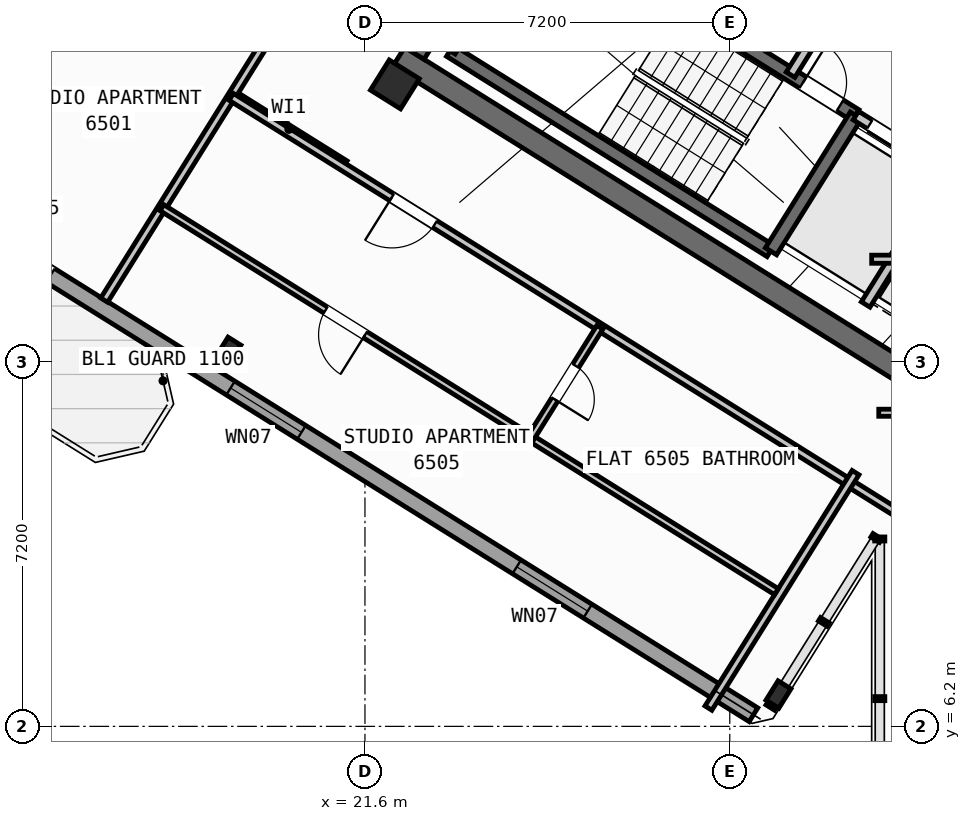
"""IFC4 building model, lengths in metres.
Left out: names, types, materials, properties, quantities, classifications, styles, units other than length and angle.
Written with IfcOpenShell. Run it as: python <this file> out.ifc"""

import sys

from ifc_helpers import new_model, si_unit, direction, frame, frame_2d, origin, origin_2d, place, context, subcontext, project, spatial, rectangle, hollow_rectangle, i_section, extrude, source, transform, mapped, element, fill, save


model = new_model("IFC4")
c1 = context("Model", 3, precision=1e-05, world=origin(), true_north=direction((0.0, 1.0)))
c2 = subcontext(c1, "Body", "Model", "MODEL_VIEW")
j1 = project(units=[si_unit("LENGTHUNIT", "METRE"), si_unit("PLANEANGLEUNIT", "RADIAN")], contexts=[c1])
p1 = place(None, origin())
s1 = spatial("IfcSite", under=j1, at=p1, CompositionType="ELEMENT")
p2 = place(p1, origin())
s2 = spatial("IfcBuilding", under=s1, at=p2, CompositionType="ELEMENT")
p3 = place(p2, frame((0.0, 0.0, 259.2)))
s3 = spatial("IfcBuildingStorey", under=s2, at=p3, CompositionType="ELEMENT", Elevation=259.2)
p4 = place(p3, frame((33.324, 12.503, 0.0), z_axis=(0.0, 0.0, 1.0), x_axis=(-0.848043529849, 0.529926571782, 0.0)))
e1 = element("IfcWall", 1, at=p4, inside=s3, PredefinedType="SHEAR", context=c2, shape_type="SweptSolid", body=[
    extrude(rectangle(XDim=13.04, YDim=0.45, at=frame_2d((6.52, 0.0))), origin(), (0.0, 0.0, 1.0), 3.35),
])
p5 = place(p3, frame((26.007, 24.976, 0.0), z_axis=(0.0, 0.0, 1.0), x_axis=(-0.529931155655, -0.848040665456, 0.0)))
e2 = element("IfcWall", 2, at=p5, inside=s3, PredefinedType="SHEAR", context=c2, shape_type="SweptSolid", body=[
    extrude(rectangle(XDim=6.475, YDim=0.45, at=frame_2d((3.238, 0.0))), origin(), (0.0, 0.0, 1.0), 3.35),
])
m1 = source(origin(), c2, "Body", "SweptSolid", [
    extrude(i_section(OverallWidth=0.3, OverallDepth=0.45, WebThickness=0.014, FlangeThickness=0.026, at=origin_2d()), origin(), (0.0, 0.0, 1.0), 3.6),
])
p6 = place(p3, frame((29.761, 6.829, 0.0), z_axis=(0.0, 0.0, 1.0), x_axis=(-0.848048096156, 0.529919264233, 0.0)))
e3 = element("IfcColumn", 3, at=p6, inside=s3, PredefinedType="COLUMN", context=c2, shape_type="MappedRepresentation", body=[
    mapped(m1, transform((0.0, 0.0, 0.0), scale=1.0)),
])
m2 = source(origin(), c2, "Body", "SweptSolid", [
    extrude(hollow_rectangle(XDim=0.7, YDim=0.7, WallThickness=0.028, at=origin_2d()), origin(), (0.0, 0.0, 1.0), 3.6),
])
p7 = place(p3, frame((22.191, 18.87, 0.0), z_axis=(0.0, 0.0, 1.0), x_axis=(-0.848048096156, 0.529919264233, 0.0)))
e4 = element("IfcColumn", 4, at=p7, inside=s3, PredefinedType="COLUMN", context=c2, shape_type="MappedRepresentation", body=[
    mapped(m2, transform((0.0, 0.0, 0.0), scale=1.0)),
])
p8 = place(p3, frame((18.906, 13.612, 0.0), z_axis=(0.0, 0.0, 1.0), x_axis=(-0.848048096156, 0.529919264233, 0.0)))
e5 = element("IfcColumn", 5, at=p8, inside=s3, PredefinedType="COLUMN", context=c2, shape_type="MappedRepresentation", body=[
    mapped(m1, transform((0.0, 0.0, 0.0), scale=1.0)),
])
p9 = place(p3, frame((29.268, 6.429, 0.0), z_axis=(0.0, 0.0, 1.0), x_axis=(-0.848049971435, 0.529916263149, 0.0)))
e6 = element("IfcWall", 6, at=p9, inside=s3, PredefinedType="STANDARD", context=c2, shape_type="SweptSolid", body=[
    extrude(rectangle(XDim=31.588, YDim=0.32, at=frame_2d((15.794, 0.0))), origin(), (0.0, 0.0, 1.0), 3.35),
])
p10 = place(p9, frame((16.362, 0.0, 0.0)))
e7 = element("IfcOpeningElement", 7, at=p10, cuts=e6, PredefinedType="OPENING", context=c2, shape_type="SweptSolid", body=[
    extrude(rectangle(XDim=1.2, YDim=2.15, at=frame_2d((0.6, 1.075))), frame((0.0, 0.17, 0.0), z_axis=(0.0, -1.0, 0.0), x_axis=(1.0, 0.0, 0.0)), (0.0, 0.0, 1.0), 0.34),
])
p11 = place(p9, frame((3.859, 0.0, 0.9)))
e8 = element("IfcOpeningElement", 8, at=p11, cuts=e6, PredefinedType="OPENING", context=c2, shape_type="SweptSolid", body=[
    extrude(rectangle(XDim=1.65, YDim=1.45, at=frame_2d((0.825, 0.725))), frame((0.0, 0.17, 0.0), z_axis=(0.0, -1.0, 0.0), x_axis=(1.0, 0.0, 0.0)), (0.0, 0.0, 1.0), 0.34),
])
p12 = place(p9, frame((10.519, 0.0, 0.9)))
e9 = element("IfcOpeningElement", 9, at=p12, cuts=e6, PredefinedType="OPENING", context=c2, shape_type="SweptSolid", body=[
    extrude(rectangle(XDim=1.65, YDim=1.45, at=frame_2d((0.825, 0.725))), frame((0.0, 0.17, 0.0), z_axis=(0.0, -1.0, 0.0), x_axis=(1.0, 0.0, 0.0)), (0.0, 0.0, 1.0), 0.34),
])
p13 = place(p9, frame((28.413, 0.0, 0.95)))
e10 = element("IfcOpeningElement", 10, at=p13, cuts=e6, PredefinedType="OPENING", context=c2, shape_type="SweptSolid", body=[
    extrude(rectangle(XDim=1.95, YDim=1.35, at=frame_2d((0.975, 0.675))), frame((0.0, 0.17, 0.0), z_axis=(0.0, -1.0, 0.0), x_axis=(1.0, 0.0, 0.0)), (0.0, 0.0, 1.0), 0.34),
])
p14 = place(p9, frame((19.699, 0.0, 1.0)))
e11 = element("IfcOpeningElement", 11, at=p14, cuts=e6, PredefinedType="OPENING", context=c2, shape_type="SweptSolid", body=[
    extrude(rectangle(XDim=0.65, YDim=1.15, at=frame_2d((0.325, 0.575))), frame((0.0, 0.17, 0.0), z_axis=(0.0, -1.0, 0.0), x_axis=(1.0, 0.0, 0.0)), (0.0, 0.0, 1.0), 0.34),
])
p15 = place(p9, frame((21.721, 0.0, 1.0)))
e12 = element("IfcOpeningElement", 12, at=p15, cuts=e6, PredefinedType="OPENING", context=c2, shape_type="SweptSolid", body=[
    extrude(rectangle(XDim=0.65, YDim=1.15, at=frame_2d((0.325, 0.575))), frame((0.0, 0.17, 0.0), z_axis=(0.0, -1.0, 0.0), x_axis=(1.0, 0.0, 0.0)), (0.0, 0.0, 1.0), 0.34),
])
p16 = place(p9, frame((23.756, 0.0, 1.0)))
e13 = element("IfcOpeningElement", 13, at=p16, cuts=e6, PredefinedType="OPENING", context=c2, shape_type="SweptSolid", body=[
    extrude(rectangle(XDim=0.65, YDim=1.15, at=frame_2d((0.325, 0.575))), frame((0.0, 0.17, 0.0), z_axis=(0.0, -1.0, 0.0), x_axis=(1.0, 0.0, 0.0)), (0.0, 0.0, 1.0), 0.34),
])
p17 = place(p9, frame((25.791, 0.0, 1.0)))
e14 = element("IfcOpeningElement", 14, at=p17, cuts=e6, PredefinedType="OPENING", context=c2, shape_type="SweptSolid", body=[
    extrude(rectangle(XDim=0.65, YDim=1.15, at=frame_2d((0.325, 0.575))), frame((0.0, 0.17, 0.0), z_axis=(0.0, -1.0, 0.0), x_axis=(1.0, 0.0, 0.0)), (0.0, 0.0, 1.0), 0.34),
])
p18 = place(p3, frame((29.605, 15.581, 0.0), z_axis=(0.0, 0.0, 1.0), x_axis=(-0.848036911448, 0.529937163087, 0.0)))
e15 = element("IfcWall", 15, at=p18, inside=s3, PredefinedType="SHEAR", context=c2, shape_type="SweptSolid", body=[
    extrude(rectangle(XDim=7.46, YDim=0.26, at=frame_2d((3.73, 0.0))), origin(), (0.0, 0.0, 1.0), 3.35),
])
p19 = place(p3, frame((31.28, 18.261, 0.0), z_axis=(0.0, 0.0, 1.0), x_axis=(-0.848051618787, 0.529913626805, 0.0)))
e16 = element("IfcWall", 16, at=p19, inside=s3, PredefinedType="SHEAR", context=c2, shape_type="SweptSolid", body=[
    extrude(rectangle(XDim=7.46, YDim=0.26, at=frame_2d((3.73, 0.0))), origin(), (0.0, 0.0, 1.0), 3.35),
])
p20 = place(p19, frame((0.36, 0.0, 0.0)))
e17 = element("IfcOpeningElement", 17, at=p20, cuts=e16, PredefinedType="OPENING", context=c2, shape_type="SweptSolid", body=[
    extrude(rectangle(XDim=0.86, YDim=2.05, at=frame_2d((0.43, 1.025))), frame((0.0, 0.14, 0.0), z_axis=(0.0, -1.0, 0.0), x_axis=(1.0, 0.0, 0.0)), (0.0, 0.0, 1.0), 0.28),
])
p21 = place(p3, frame((31.288, 18.256, 0.0), z_axis=(0.0, 0.0, 1.0), x_axis=(-0.529943379326, -0.848033026897, 0.0)))
e18 = element("IfcWall", 18, at=p21, inside=s3, PredefinedType="SHEAR", context=c2, shape_type="SweptSolid", body=[
    extrude(rectangle(XDim=3.16, YDim=0.26, at=frame_2d((1.58, 0.0))), origin(), (0.0, 0.0, 1.0), 3.35),
])
p22 = place(p3, frame((24.945, 22.22, 0.0), z_axis=(0.0, 0.0, 1.0), x_axis=(-0.529908658664, -0.84805472316, 0.0)))
e19 = element("IfcWall", 19, at=p22, inside=s3, PredefinedType="SHEAR", context=c2, shape_type="SweptSolid", body=[
    extrude(rectangle(XDim=3.16, YDim=0.26, at=frame_2d((1.58, 0.0))), origin(), (0.0, 0.0, 1.0), 3.35),
])
p23 = place(p3, frame((34.933, 15.978, 0.0), z_axis=(0.0, 0.0, 1.0), x_axis=(-0.848055739377, 0.529907032327, 0.0)))
e20 = element("IfcWall", 20, at=p23, inside=s3, PredefinedType="STANDARD", context=c2, shape_type="SweptSolid", body=[
    extrude(rectangle(XDim=4.298, YDim=0.2, at=frame_2d((2.149, 0.0))), origin(), (0.0, 0.0, 1.0), 3.34),
])
p24 = place(p23, frame((0.448, 0.0, 0.0)))
e21 = element("IfcOpeningElement", 21, at=p24, cuts=e20, PredefinedType="OPENING", context=c2, shape_type="SweptSolid", body=[
    extrude(rectangle(XDim=1.3, YDim=2.2, at=frame_2d((0.65, 1.1))), frame((0.0, 0.11, 0.0), z_axis=(0.0, -1.0, 0.0), x_axis=(1.0, 0.0, 0.0)), (0.0, 0.0, 1.0), 0.22),
])
p25 = place(p23, frame((2.523, 0.0, 0.0)))
e22 = element("IfcOpeningElement", 22, at=p25, cuts=e20, PredefinedType="OPENING", context=c2, shape_type="SweptSolid", body=[
    extrude(rectangle(XDim=1.45, YDim=2.25, at=frame_2d((0.725, 1.125))), frame((0.0, 0.11, 0.0), z_axis=(0.0, -1.0, 0.0), x_axis=(1.0, 0.0, 0.0)), (0.0, 0.0, 1.0), 0.22),
])
p26 = place(p3, frame((36.459, 18.421, 0.0), z_axis=(0.0, 0.0, 1.0), x_axis=(-0.848059591691, 0.529900867089, 0.0)))
e23 = element("IfcWall", 23, at=p26, inside=s3, PredefinedType="STANDARD", context=c2, shape_type="SweptSolid", body=[
    extrude(rectangle(XDim=5.818, YDim=0.2, at=frame_2d((2.909, 0.0))), origin(), (0.0, 0.0, 1.0), 3.34),
])
p27 = place(p26, frame((2.598, 0.0, 0.0)))
e24 = element("IfcOpeningElement", 24, at=p27, cuts=e23, PredefinedType="OPENING", context=c2, shape_type="SweptSolid", body=[
    extrude(rectangle(XDim=1.15, YDim=2.1, at=frame_2d((0.575, 1.05))), frame((0.0, 0.11, 0.0), z_axis=(0.0, -1.0, 0.0), x_axis=(1.0, 0.0, 0.0)), (0.0, 0.0, 1.0), 0.22),
])
p28 = place(p3, frame((33.029, 17.003, 0.0), z_axis=(0.0, 0.0, 1.0), x_axis=(-0.529916267533, -0.848049968695, 0.0)))
e25 = element("IfcWall", 25, at=p28, inside=s3, PredefinedType="STANDARD", context=c2, shape_type="SweptSolid", body=[
    extrude(rectangle(XDim=2.92, YDim=0.2, at=frame_2d((1.46, 0.0))), origin(), (0.0, 0.0, 1.0), 3.34),
])
p29 = place(p3, frame((31.525, 21.504, 0.0), z_axis=(0.0, 0.0, 1.0), x_axis=(-0.529907497854, -0.848055448493, 0.0)))
e26 = element("IfcWall", 26, at=p29, inside=s3, PredefinedType="STANDARD", context=c2, shape_type="SweptSolid", body=[
    extrude(rectangle(XDim=2.88, YDim=0.2, at=frame_2d((1.44, 0.0))), origin(), (0.0, 0.0, 1.0), 3.34),
])
p30 = place(p3, frame((21.206, 17.292, 0.0), z_axis=(0.0, 0.0, 1.0), x_axis=(-0.848050851465, 0.529914854792, 0.0)))
e27 = element("IfcWall", 27, at=p30, inside=s3, PredefinedType="PARTITIONING", context=c2, shape_type="SweptSolid", body=[
    extrude(rectangle(XDim=2.61, YDim=0.16, at=frame_2d((1.305, 0.0))), origin(), (0.0, 0.0, 1.0), 3.34),
])
p31 = place(p3, frame((23.899, 26.529, 0.0), z_axis=(0.0, 0.0, 1.0), x_axis=(-0.529917716469, -0.848049063305, 0.0)))
e28 = element("IfcWall", 28, at=p31, inside=s3, PredefinedType="PARTITIONING", context=c2, shape_type="SweptSolid", body=[
    extrude(rectangle(XDim=14.05, YDim=0.16, at=frame_2d((7.025, 0.0))), origin(), (0.0, 0.0, 1.0), 3.34),
])
p32 = place(p3, frame((16.572, 21.954, 0.0), z_axis=(0.0, 0.0, 1.0), x_axis=(-0.529904903214, -0.848057069748, 0.0)))
e29 = element("IfcWall", 29, at=p32, inside=s3, PredefinedType="PARTITIONING", context=c2, shape_type="SweptSolid", body=[
    extrude(rectangle(XDim=5.601, YDim=0.16, at=frame_2d((2.801, 0.0))), origin(), (0.0, 0.0, 1.0), 2.875),
])
p33 = place(p3, frame((16.638, 25.901, 0.0), z_axis=(0.0, 0.0, 1.0), x_axis=(-0.529910626741, -0.8480534934, 0.0)))
e30 = element("IfcWall", 30, at=p33, inside=s3, PredefinedType="PARTITIONING", context=c2, shape_type="SweptSolid", body=[
    extrude(rectangle(XDim=9.94, YDim=0.11, at=frame_2d((4.97, 0.0))), origin(), (0.0, 0.0, 1.0), 3.025),
])
p34 = place(p3, frame((32.164, 10.374, 0.0), z_axis=(0.0, 0.0, 1.0), x_axis=(-0.848044107957, 0.529925646633, 0.0)))
e31 = element("IfcWall", 31, at=p34, inside=s3, PredefinedType="PARTITIONING", context=c2, shape_type="SweptSolid", body=[
    extrude(rectangle(XDim=15.57, YDim=0.16, at=frame_2d((7.785, 0.0))), origin(), (0.0, 0.0, 1.0), 3.34),
])
p35 = place(p34, frame((10.83, 0.0, 0.0)))
e32 = element("IfcOpeningElement", 32, at=p35, cuts=e31, PredefinedType="OPENING", context=c2, shape_type="SweptSolid", body=[
    extrude(rectangle(XDim=1.0, YDim=2.1, at=frame_2d((0.5, 1.05))), frame((0.0, 0.09, 0.0), z_axis=(0.0, -1.0, 0.0), x_axis=(1.0, 0.0, 0.0)), (0.0, 0.0, 1.0), 0.18),
])
p36 = place(p3, frame((31.282, 11.208, 0.0), z_axis=(0.0, 0.0, 1.0), x_axis=(-0.529938869374, -0.84803584519, 0.0)))
e33 = element("IfcWall", 33, at=p36, inside=s3, PredefinedType="PARTITIONING", context=c2, shape_type="SweptSolid", body=[
    extrude(rectangle(XDim=5.48, YDim=0.16, at=frame_2d((2.74, 0.0))), origin(), (0.0, 0.0, 1.0), 3.34),
])
p37 = place(p3, frame((29.72, 8.859, 0.0), z_axis=(0.0, 0.0, 1.0), x_axis=(-0.848049134363, 0.529917602752, 0.0)))
e34 = element("IfcWall", 34, at=p37, inside=s3, PredefinedType="PLUMBINGWALL", context=c2, shape_type="SweptSolid", body=[
    extrude(rectangle(XDim=14.3, YDim=0.14, at=frame_2d((7.15, 0.0))), origin(), (0.0, 0.0, 1.0), 3.34),
])
p38 = place(p37, frame((9.57, 0.0, 0.0)))
e35 = element("IfcOpeningElement", 35, at=p38, cuts=e34, PredefinedType="OPENING", context=c2, shape_type="SweptSolid", body=[
    extrude(rectangle(XDim=0.92, YDim=2.08, at=frame_2d((0.46, 1.04))), frame((0.0, 0.08, 0.0), z_axis=(0.0, -1.0, 0.0), x_axis=(1.0, 0.0, 0.0)), (0.0, 0.0, 1.0), 0.16),
])
p39 = place(p3, frame((26.237, 14.078, 0.0), z_axis=(0.0, 0.0, 1.0), x_axis=(-0.52995640672, -0.848024885824, 0.0)))
e36 = element("IfcWall", 36, at=p39, inside=s3, PredefinedType="PLUMBINGWALL", context=c2, shape_type="SweptSolid", body=[
    extrude(rectangle(XDim=2.58, YDim=0.14, at=frame_2d((1.29, 0.0))), origin(), (0.0, 0.0, 1.0), 3.34),
])
p40 = place(p39, frame((0.9, 0.0, 0.0)))
e37 = element("IfcOpeningElement", 37, at=p40, cuts=e36, PredefinedType="OPENING", context=c2, shape_type="SweptSolid", body=[
    extrude(rectangle(XDim=0.78, YDim=2.05, at=frame_2d((0.39, 1.025))), frame((0.0, 0.08, 0.0), z_axis=(0.0, -1.0, 0.0), x_axis=(1.0, 0.0, 0.0)), (0.0, 0.0, 1.0), 0.16),
])
p41 = place(p3, frame((31.6, 15.42, 0.0), z_axis=(0.0, 0.0, 1.0), x_axis=(1.0, 0.0, 0.0)))
e38 = element("IfcWall", 38, at=p41, inside=s3, PredefinedType="PARTITIONING", context=c2, shape_type="SweptSolid", body=[
    extrude(rectangle(XDim=2.984, YDim=0.16, at=frame_2d((1.492, 0.0))), origin(), (0.0, 0.0, 1.0), 3.34),
])
p42 = place(p3, frame((31.74, 12.39, 0.0), z_axis=(0.0, 0.0, 1.0), x_axis=(1.0, 0.0, 0.0)))
e39 = element("IfcWall", 39, at=p42, inside=s3, PredefinedType="PLUMBINGWALL", context=c2, shape_type="SweptSolid", body=[
    extrude(rectangle(XDim=1.069, YDim=0.14, at=frame_2d((0.534, 0.0))), origin(), (0.0, 0.0, 1.0), 3.34),
])
m3 = source(origin(), c2, "Body", "SweptSolid", [
    extrude(rectangle(XDim=1.65, YDim=1.45, at=frame_2d((0.825, 0.725))), frame((0.0, 0.03, 0.0), z_axis=(0.0, -1.0, 0.0), x_axis=(1.0, 0.0, 0.0)), (0.0, 0.0, 1.0), 0.06),
])
p43 = place(p11, origin())
e40 = element("IfcWindow", 40, at=p43, inside=s3, PartitioningType="SINGLE_PANEL", PredefinedType="WINDOW", context=c2, shape_type="MappedRepresentation", body=[
    mapped(m3, transform((0.0, 0.0, 0.0), scale=1.0)),
])
fill(e8, e40)
p44 = place(p12, origin())
e41 = element("IfcWindow", 41, at=p44, inside=s3, PartitioningType="SINGLE_PANEL", PredefinedType="WINDOW", context=c2, shape_type="MappedRepresentation", body=[
    mapped(m3, transform((0.0, 0.0, 0.0), scale=1.0)),
])
fill(e9, e41)
m4 = source(origin(), c2, "Body", "SweptSolid", [
    extrude(rectangle(XDim=0.86, YDim=2.05, at=frame_2d((0.43, 1.025))), frame((0.0, 0.025, 0.0), z_axis=(0.0, -1.0, 0.0), x_axis=(1.0, 0.0, 0.0)), (0.0, 0.0, 1.0), 0.05),
])
p45 = place(p20, frame((0.86, 0.0, 0.0), z_axis=(0.0, 0.0, 1.0), x_axis=(-1.0, 0.0, 0.0)))
e42 = element("IfcDoor", 42, at=p45, inside=s3, OperationType="SINGLE_SWING_LEFT", PredefinedType="DOOR", context=c2, shape_type="MappedRepresentation", body=[
    mapped(m4, transform((0.0, 0.0, 0.0), scale=1.0)),
])
fill(e17, e42)
m5 = source(origin(), c2, "Body", "SweptSolid", [
    extrude(rectangle(XDim=1.45, YDim=2.25, at=frame_2d((0.725, 1.125))), frame((0.0, 0.025, 0.0), z_axis=(0.0, -1.0, 0.0), x_axis=(1.0, 0.0, 0.0)), (0.0, 0.0, 1.0), 0.05),
])
p46 = place(p25, origin())
e43 = element("IfcDoor", 43, at=p46, inside=s3, OperationType="DOUBLE_DOOR_SLIDING", PredefinedType="DOOR", context=c2, shape_type="MappedRepresentation", body=[
    mapped(m5, transform((0.0, 0.0, 0.0), scale=1.0)),
])
fill(e22, e43)
m6 = source(origin(), c2, "Body", "SweptSolid", [
    extrude(rectangle(XDim=1.0, YDim=2.1, at=frame_2d((0.5, 1.05))), frame((0.0, 0.025, 0.0), z_axis=(0.0, -1.0, 0.0), x_axis=(1.0, 0.0, 0.0)), (0.0, 0.0, 1.0), 0.05),
])
p47 = place(p35, origin())
e44 = element("IfcDoor", 44, at=p47, inside=s3, OperationType="SINGLE_SWING_RIGHT", PredefinedType="DOOR", context=c2, shape_type="MappedRepresentation", body=[
    mapped(m6, transform((0.0, 0.0, 0.0), scale=1.0)),
])
fill(e32, e44)
m7 = source(origin(), c2, "Body", "SweptSolid", [
    extrude(rectangle(XDim=0.92, YDim=2.08, at=frame_2d((0.46, 1.04))), frame((0.0, 0.025, 0.0), z_axis=(0.0, -1.0, 0.0), x_axis=(1.0, 0.0, 0.0)), (0.0, 0.0, 1.0), 0.05),
])
p48 = place(p38, origin())
e45 = element("IfcDoor", 45, at=p48, inside=s3, OperationType="SINGLE_SWING_LEFT", PredefinedType="DOOR", context=c2, shape_type="MappedRepresentation", body=[
    mapped(m7, transform((0.0, 0.0, 0.0), scale=1.0)),
])
fill(e35, e45)
m8 = source(origin(), c2, "Body", "SweptSolid", [
    extrude(rectangle(XDim=0.78, YDim=2.05, at=frame_2d((0.39, 1.025))), frame((0.0, 0.025, 0.0), z_axis=(0.0, -1.0, 0.0), x_axis=(1.0, 0.0, 0.0)), (0.0, 0.0, 1.0), 0.05),
])
p49 = place(p40, origin())
e46 = element("IfcDoor", 46, at=p49, inside=s3, OperationType="SINGLE_SWING_RIGHT", PredefinedType="DOOR", context=c2, shape_type="MappedRepresentation", body=[
    mapped(m8, transform((0.0, 0.0, 0.0), scale=1.0)),
])
fill(e37, e46)
save(model, sys.argv[1])
